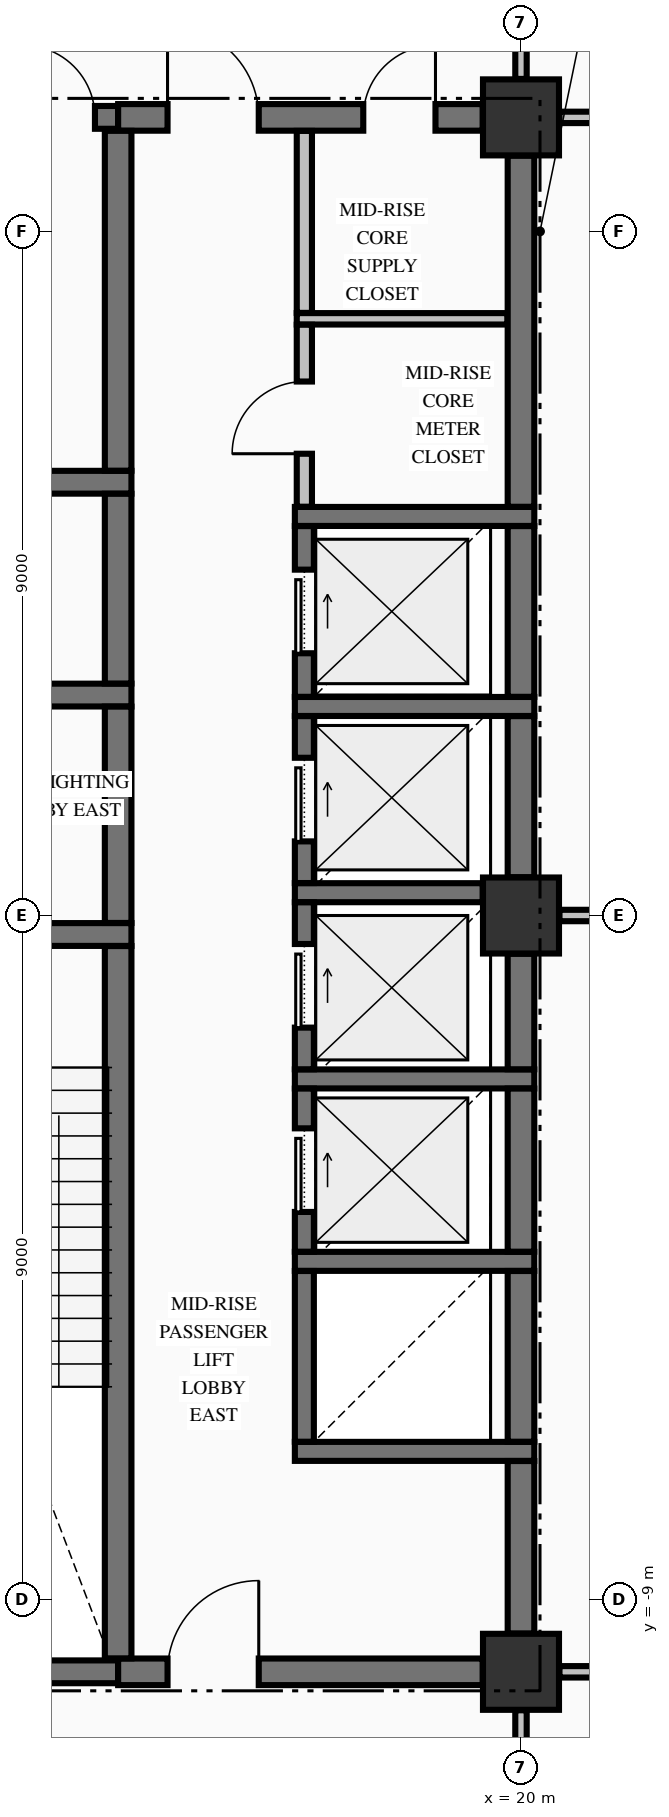
"""IFC4 building model, lengths in metres.
Left out: names, types, materials, properties, quantities, classifications, styles, units other than length and angle.
Written with IfcOpenShell. Run it as: python <this file> out.ifc"""

import sys

from ifc_helpers import new_model, si_unit, direction, frame, frame_2d, origin, origin_2d, place, context, subcontext, project, spatial, rectangle, extrude, element, fill, save


model = new_model("IFC4")
c1 = context("Model", 3, precision=1e-05, world=origin(), true_north=direction((0.0, 1.0)))
c2 = subcontext(c1, "Body", "Model", "MODEL_VIEW")
j1 = project(units=[si_unit("LENGTHUNIT", "METRE"), si_unit("PLANEANGLEUNIT", "RADIAN")], contexts=[c1])
p1 = place(None, origin())
s1 = spatial("IfcSite", under=j1, at=p1, CompositionType="ELEMENT")
p2 = place(p1, origin())
s2 = spatial("IfcBuilding", under=s1, at=p2, CompositionType="ELEMENT")
p3 = place(p2, frame((0.0, 0.0, 116.35)))
s3 = spatial("IfcBuildingStorey", under=s2, at=p3, CompositionType="ELEMENT", Elevation=116.35)
for number, where, z_axis, x_axis in (
    (1, (20.0, -9.95, -0.425), (0.0, 0.0, 1.0), (1.0, 0.0, 0.0)),
    (2, (20.0, 10.5, -0.425), (0.0, 0.0, 1.0), (1.0, 0.0, 0.0)),
    (3, (20.0, 0.0, -0.425), (0.0, 0.0, 1.0), (1.0, 0.0, 0.0)),
):
    element("IfcColumn", number, at=place(p3, frame(where, z_axis=z_axis, x_axis=x_axis)), inside=s3, PredefinedType="COLUMN", context=c2, shape_type="SweptSolid", body=[
        extrude(rectangle(XDim=1.0, YDim=1.0, at=origin_2d()), origin(), (0.0, 0.0, 1.0), 5.0),
    ])
p4 = place(p3, frame((11.504, -9.95, 0.0), z_axis=(0.0, 0.0, 1.0), x_axis=(1.0, 0.0, 0.0)))
e4 = element("IfcWall", 4, at=p4, inside=s3, PredefinedType="SHEAR", context=c2, shape_type="SweptSolid", body=[
    extrude(rectangle(XDim=3.196, YDim=0.3, at=frame_2d((1.598, 0.0))), origin(), (0.0, 0.0, 1.0), 4.575),
])
p5 = place(p3, frame((14.7, -9.95, 0.0), z_axis=(0.0, 0.0, 1.0), x_axis=(1.0, 0.0, 0.0)))
e5 = element("IfcWall", 5, at=p5, inside=s3, PredefinedType="SHEAR", context=c2, shape_type="SweptSolid", body=[
    extrude(rectangle(XDim=4.796, YDim=0.35, at=frame_2d((2.398, 0.0))), origin(), (0.0, 0.0, 1.0), 4.575),
])
p6 = place(p5, frame((0.65, 0.0, 0.0)))
e6 = element("IfcOpeningElement", 6, at=p6, cuts=e5, PredefinedType="OPENING", context=c2, shape_type="SweptSolid", body=[
    extrude(rectangle(XDim=1.2, YDim=2.15, at=frame_2d((0.6, 1.075))), frame((0.0, 0.185, 0.0), z_axis=(0.0, -1.0, 0.0), x_axis=(1.0, 0.0, 0.0)), (0.0, 0.0, 1.0), 0.37),
])
for number, where, z_axis, x_axis in (
    (7, (17.025, -7.05, 0.0), (0.0, 0.0, 1.0), (1.0, 0.0, 0.0)),
    (8, (17.025, -4.55, 0.0), (0.0, 0.0, 1.0), (1.0, 0.0, 0.0)),
    (9, (17.025, -2.15, 0.0), (0.0, 0.0, 1.0), (1.0, 0.0, 0.0)),
):
    element("IfcWall", number, at=place(p3, frame(where, z_axis=z_axis, x_axis=x_axis)), inside=s3, PredefinedType="SOLIDWALL", context=c2, shape_type="SweptSolid", body=[
        extrude(rectangle(XDim=3.15, YDim=0.25, at=frame_2d((1.575, 0.0))), origin(), (0.0, 0.0, 1.0), 4.575),
    ])
p7 = place(p3, frame((11.504, -0.25, 0.0), z_axis=(0.0, 0.0, 1.0), x_axis=(1.0, 0.0, 0.0)))
e10 = element("IfcWall", 10, at=p7, inside=s3, PredefinedType="SHEAR", context=c2, shape_type="SweptSolid", body=[
    extrude(rectangle(XDim=3.371, YDim=0.3, at=frame_2d((1.686, 0.0))), origin(), (0.0, 0.0, 1.0), 4.575),
])
p8 = place(p7, frame((1.096, 0.0, 0.0)))
e11 = element("IfcOpeningElement", 11, at=p8, cuts=e10, PredefinedType="OPENING", context=c2, shape_type="SweptSolid", body=[
    extrude(rectangle(XDim=1.1, YDim=2.15, at=frame_2d((0.55, 1.075))), frame((0.0, 0.16, 0.0), z_axis=(0.0, -1.0, 0.0), x_axis=(1.0, 0.0, 0.0)), (0.0, 0.0, 1.0), 0.32),
])
p9 = place(p3, frame((17.025, 0.3, 0.0), z_axis=(0.0, 0.0, 1.0), x_axis=(1.0, 0.0, 0.0)))
e12 = element("IfcWall", 12, at=p9, inside=s3, PredefinedType="SOLIDWALL", context=c2, shape_type="SweptSolid", body=[
    extrude(rectangle(XDim=2.471, YDim=0.25, at=frame_2d((1.236, 0.0))), origin(), (0.0, 0.0, 1.0), 4.575),
])
p10 = place(p3, frame((17.025, 2.75, 0.0), z_axis=(0.0, 0.0, 1.0), x_axis=(1.0, 0.0, 0.0)))
e13 = element("IfcWall", 13, at=p10, inside=s3, PredefinedType="SOLIDWALL", context=c2, shape_type="SweptSolid", body=[
    extrude(rectangle(XDim=3.15, YDim=0.25, at=frame_2d((1.575, 0.0))), origin(), (0.0, 0.0, 1.0), 4.575),
])
p11 = place(p3, frame((10.85, 2.9, 0.0), z_axis=(0.0, 0.0, 1.0), x_axis=(1.0, 0.0, 0.0)))
e14 = element("IfcWall", 14, at=p11, inside=s3, PredefinedType="SHEAR", context=c2, shape_type="SweptSolid", body=[
    extrude(rectangle(XDim=4.025, YDim=0.3, at=frame_2d((2.012, 0.0))), origin(), (0.0, 0.0, 1.0), 4.575),
])
p12 = place(p11, frame((0.85, 0.0, 0.0)))
e15 = element("IfcOpeningElement", 15, at=p12, cuts=e14, PredefinedType="OPENING", context=c2, shape_type="SweptSolid", body=[
    extrude(rectangle(XDim=1.1, YDim=2.2, at=frame_2d((0.55, 1.1))), frame((0.0, 0.16, 0.0), z_axis=(0.0, -1.0, 0.0), x_axis=(1.0, 0.0, 0.0)), (0.0, 0.0, 1.0), 0.32),
])
p13 = place(p3, frame((17.025, 5.25, 0.0), z_axis=(0.0, 0.0, 1.0), x_axis=(1.0, 0.0, 0.0)))
e16 = element("IfcWall", 16, at=p13, inside=s3, PredefinedType="SOLIDWALL", context=c2, shape_type="SweptSolid", body=[
    extrude(rectangle(XDim=3.15, YDim=0.25, at=frame_2d((1.575, 0.0))), origin(), (0.0, 0.0, 1.0), 4.575),
])
p14 = place(p3, frame((10.85, 5.7, 0.0), z_axis=(0.0, 0.0, 1.0), x_axis=(1.0, 0.0, 0.0)))
e17 = element("IfcWall", 17, at=p14, inside=s3, PredefinedType="SHEAR", context=c2, shape_type="SweptSolid", body=[
    extrude(rectangle(XDim=4.025, YDim=0.3, at=frame_2d((2.012, 0.0))), origin(), (0.0, 0.0, 1.0), 4.575),
])
p15 = place(p3, frame((11.504, 10.5, 0.0), z_axis=(0.0, 0.0, 1.0), x_axis=(1.0, 0.0, 0.0)))
e18 = element("IfcWall", 18, at=p15, inside=s3, PredefinedType="SHEAR", context=c2, shape_type="SweptSolid", body=[
    extrude(rectangle(XDim=3.196, YDim=0.3, at=frame_2d((1.598, 0.0))), origin(), (0.0, 0.0, 1.0), 4.575),
])
p16 = place(p15, frame((1.941, 0.0, 0.0)))
e19 = element("IfcOpeningElement", 19, at=p16, cuts=e18, PredefinedType="OPENING", context=c2, shape_type="SweptSolid", body=[
    extrude(rectangle(XDim=0.95, YDim=2.15, at=frame_2d((0.475, 1.075))), frame((0.0, 0.16, 0.0), z_axis=(0.0, -1.0, 0.0), x_axis=(1.0, 0.0, 0.0)), (0.0, 0.0, 1.0), 0.32),
])
p17 = place(p3, frame((14.7, 10.5, 0.0), z_axis=(0.0, 0.0, 1.0), x_axis=(1.0, 0.0, 0.0)))
e20 = element("IfcWall", 20, at=p17, inside=s3, PredefinedType="SHEAR", context=c2, shape_type="SweptSolid", body=[
    extrude(rectangle(XDim=4.796, YDim=0.35, at=frame_2d((2.398, 0.0))), origin(), (0.0, 0.0, 1.0), 4.575),
])
p18 = place(p17, frame((0.65, 0.0, 0.0)))
e21 = element("IfcOpeningElement", 21, at=p18, cuts=e20, PredefinedType="OPENING", context=c2, shape_type="SweptSolid", body=[
    extrude(rectangle(XDim=1.2, YDim=2.15, at=frame_2d((0.6, 1.075))), frame((0.0, 0.185, 0.0), z_axis=(0.0, -1.0, 0.0), x_axis=(1.0, 0.0, 0.0)), (0.0, 0.0, 1.0), 0.37),
])
p19 = place(p17, frame((3.225, 0.0, 0.0)))
e22 = element("IfcOpeningElement", 22, at=p19, cuts=e20, PredefinedType="OPENING", context=c2, shape_type="SweptSolid", body=[
    extrude(rectangle(XDim=0.95, YDim=2.15, at=frame_2d((0.475, 1.075))), frame((0.0, 0.185, 0.0), z_axis=(0.0, -1.0, 0.0), x_axis=(1.0, 0.0, 0.0)), (0.0, 0.0, 1.0), 0.37),
])
p20 = place(p3, frame((20.506, -9.95, 0.0), z_axis=(0.0, 0.0, 1.0), x_axis=(1.0, 0.0, 0.0)))
e23 = element("IfcWall", 23, at=p20, inside=s3, PredefinedType="PARTITIONING", context=c2, shape_type="SweptSolid", body=[
    extrude(rectangle(XDim=7.329, YDim=0.15, at=frame_2d((3.665, 0.0))), origin(), (0.0, 0.0, 1.0), 4.575),
])
p21 = place(p20, frame((3.019, 0.0, 0.0)))
e24 = element("IfcOpeningElement", 24, at=p21, cuts=e23, PredefinedType="OPENING", context=c2, shape_type="SweptSolid", body=[
    extrude(rectangle(XDim=0.95, YDim=2.02, at=frame_2d((0.475, 1.01))), frame((0.0, 0.085, 0.0), z_axis=(0.0, -1.0, 0.0), x_axis=(1.0, 0.0, 0.0)), (0.0, 0.0, 1.0), 0.17),
])
p22 = place(p3, frame((20.506, 0.0, 0.0), z_axis=(0.0, 0.0, 1.0), x_axis=(1.0, 0.0, 0.0)))
e25 = element("IfcWall", 25, at=p22, inside=s3, PredefinedType="PARTITIONING", context=c2, shape_type="SweptSolid", body=[
    extrude(rectangle(XDim=6.888, YDim=0.15, at=frame_2d((3.444, 0.0))), origin(), (0.0, 0.0, 1.0), 4.03),
])
p23 = place(p3, frame((17.05, 7.85, 0.0), z_axis=(0.0, 0.0, 1.0), x_axis=(1.0, 0.0, 0.0)))
e26 = element("IfcWall", 26, at=p23, inside=s3, PredefinedType="PARTITIONING", context=c2, shape_type="SweptSolid", body=[
    extrude(rectangle(XDim=2.772, YDim=0.15, at=frame_2d((1.386, 0.0))), origin(), (0.0, 0.0, 1.0), 4.575),
])
p24 = place(p3, frame((20.506, 10.5, 0.0), z_axis=(0.0, 0.0, 1.0), x_axis=(1.0, 0.0, 0.0)))
e27 = element("IfcWall", 27, at=p24, inside=s3, PredefinedType="PARTITIONING", context=c2, shape_type="SweptSolid", body=[
    extrude(rectangle(XDim=7.329, YDim=0.15, at=frame_2d((3.665, 0.0))), origin(), (0.0, 0.0, 1.0), 4.575),
])
p25 = place(p24, frame((3.019, 0.0, 0.0)))
e28 = element("IfcOpeningElement", 28, at=p25, cuts=e27, PredefinedType="OPENING", context=c2, shape_type="SweptSolid", body=[
    extrude(rectangle(XDim=0.95, YDim=2.02, at=frame_2d((0.475, 1.01))), frame((0.0, 0.085, 0.0), z_axis=(0.0, -1.0, 0.0), x_axis=(1.0, 0.0, 0.0)), (0.0, 0.0, 1.0), 0.17),
])
p26 = place(p3, frame((14.7, -9.773, 0.0), z_axis=(0.0, 0.0, 1.0), x_axis=(0.0, 1.0, 0.0)))
e29 = element("IfcWall", 29, at=p26, inside=s3, PredefinedType="SHEAR", context=c2, shape_type="SweptSolid", body=[
    extrude(rectangle(XDim=9.371, YDim=0.35, at=frame_2d((4.686, 0.0))), origin(), (0.0, 0.0, 1.0), 4.575),
])
p27 = place(p3, frame((14.7, -0.098, 0.0), z_axis=(0.0, 0.0, 1.0), x_axis=(0.0, 1.0, 0.0)))
e30 = element("IfcWall", 30, at=p27, inside=s3, PredefinedType="SHEAR", context=c2, shape_type="SweptSolid", body=[
    extrude(rectangle(XDim=2.846, YDim=0.35, at=frame_2d((1.423, 0.0))), origin(), (0.0, 0.0, 1.0), 4.575),
])
p28 = place(p3, frame((14.7, 3.052, 0.0), z_axis=(0.0, 0.0, 1.0), x_axis=(0.0, 1.0, 0.0)))
e31 = element("IfcWall", 31, at=p28, inside=s3, PredefinedType="SHEAR", context=c2, shape_type="SweptSolid", body=[
    extrude(rectangle(XDim=2.496, YDim=0.35, at=frame_2d((1.248, 0.0))), origin(), (0.0, 0.0, 1.0), 4.575),
])
p29 = place(p3, frame((14.7, 5.852, 0.0), z_axis=(0.0, 0.0, 1.0), x_axis=(0.0, 1.0, 0.0)))
e32 = element("IfcWall", 32, at=p29, inside=s3, PredefinedType="SHEAR", context=c2, shape_type="SweptSolid", body=[
    extrude(rectangle(XDim=4.471, YDim=0.35, at=frame_2d((2.235, 0.0))), origin(), (0.0, 0.0, 1.0), 4.575),
])
p30 = place(p3, frame((17.15, -6.923, 0.0), z_axis=(0.0, 0.0, 1.0), x_axis=(0.0, 1.0, 0.0)))
e33 = element("IfcWall", 33, at=p30, inside=s3, PredefinedType="SOLIDWALL", context=c2, shape_type="SweptSolid", body=[
    extrude(rectangle(XDim=2.246, YDim=0.25, at=frame_2d((1.123, 0.0))), origin(), (0.0, 0.0, 1.0), 4.575),
])
p31 = place(p3, frame((17.15, -4.423, 0.0), z_axis=(0.0, 0.0, 1.0), x_axis=(0.0, 1.0, 0.0)))
e34 = element("IfcWall", 34, at=p31, inside=s3, PredefinedType="SOLIDWALL", context=c2, shape_type="SweptSolid", body=[
    extrude(rectangle(XDim=2.146, YDim=0.25, at=frame_2d((1.073, 0.0))), origin(), (0.0, 0.0, 1.0), 4.575),
])
p32 = place(p31, frame((0.523, 0.0, 0.0)))
e35 = element("IfcOpeningElement", 35, at=p32, cuts=e34, PredefinedType="OPENING", context=c2, shape_type="SweptSolid", body=[
    extrude(rectangle(XDim=1.1, YDim=2.2, at=frame_2d((0.55, 1.1))), frame((0.0, 0.135, 0.0), z_axis=(0.0, -1.0, 0.0), x_axis=(1.0, 0.0, 0.0)), (0.0, 0.0, 1.0), 0.27),
])
p33 = place(p3, frame((17.15, -2.023, 0.0), z_axis=(0.0, 0.0, 1.0), x_axis=(0.0, 1.0, 0.0)))
e36 = element("IfcWall", 36, at=p33, inside=s3, PredefinedType="SOLIDWALL", context=c2, shape_type="SweptSolid", body=[
    extrude(rectangle(XDim=2.196, YDim=0.25, at=frame_2d((1.098, 0.0))), origin(), (0.0, 0.0, 1.0), 4.575),
])
p34 = place(p33, frame((0.548, 0.0, 0.0)))
e37 = element("IfcOpeningElement", 37, at=p34, cuts=e36, PredefinedType="OPENING", context=c2, shape_type="SweptSolid", body=[
    extrude(rectangle(XDim=1.1, YDim=2.2, at=frame_2d((0.55, 1.1))), frame((0.0, 0.135, 0.0), z_axis=(0.0, -1.0, 0.0), x_axis=(1.0, 0.0, 0.0)), (0.0, 0.0, 1.0), 0.27),
])
p35 = place(p3, frame((17.15, 0.427, 0.0), z_axis=(0.0, 0.0, 1.0), x_axis=(0.0, 1.0, 0.0)))
e38 = element("IfcWall", 38, at=p35, inside=s3, PredefinedType="SOLIDWALL", context=c2, shape_type="SweptSolid", body=[
    extrude(rectangle(XDim=2.196, YDim=0.25, at=frame_2d((1.098, 0.0))), origin(), (0.0, 0.0, 1.0), 4.575),
])
p36 = place(p35, frame((0.548, 0.0, 0.0)))
e39 = element("IfcOpeningElement", 39, at=p36, cuts=e38, PredefinedType="OPENING", context=c2, shape_type="SweptSolid", body=[
    extrude(rectangle(XDim=1.1, YDim=2.2, at=frame_2d((0.55, 1.1))), frame((0.0, 0.135, 0.0), z_axis=(0.0, -1.0, 0.0), x_axis=(1.0, 0.0, 0.0)), (0.0, 0.0, 1.0), 0.27),
])
p37 = place(p3, frame((17.15, 2.877, 0.0), z_axis=(0.0, 0.0, 1.0), x_axis=(0.0, 1.0, 0.0)))
e40 = element("IfcWall", 40, at=p37, inside=s3, PredefinedType="SOLIDWALL", context=c2, shape_type="SweptSolid", body=[
    extrude(rectangle(XDim=2.246, YDim=0.25, at=frame_2d((1.123, 0.0))), origin(), (0.0, 0.0, 1.0), 4.575),
])
p38 = place(p37, frame((0.573, 0.0, 0.0)))
e41 = element("IfcOpeningElement", 41, at=p38, cuts=e40, PredefinedType="OPENING", context=c2, shape_type="SweptSolid", body=[
    extrude(rectangle(XDim=1.1, YDim=2.2, at=frame_2d((0.55, 1.1))), frame((0.0, 0.135, 0.0), z_axis=(0.0, -1.0, 0.0), x_axis=(1.0, 0.0, 0.0)), (0.0, 0.0, 1.0), 0.27),
])
p39 = place(p3, frame((20.0, -9.446, 0.0), z_axis=(0.0, 0.0, 1.0), x_axis=(0.0, 1.0, 0.0)))
e42 = element("IfcWall", 42, at=p39, inside=s3, PredefinedType="SHEAR", context=c2, shape_type="SweptSolid", body=[
    extrude(rectangle(XDim=2.269, YDim=0.35, at=frame_2d((1.135, 0.0))), origin(), (0.0, 0.0, 1.0), 4.575),
])
p40 = place(p3, frame((20.0, -6.923, 0.0), z_axis=(0.0, 0.0, 1.0), x_axis=(0.0, 1.0, 0.0)))
e43 = element("IfcWall", 43, at=p40, inside=s3, PredefinedType="SHEAR", context=c2, shape_type="SweptSolid", body=[
    extrude(rectangle(XDim=2.246, YDim=0.35, at=frame_2d((1.123, 0.0))), origin(), (0.0, 0.0, 1.0), 4.575),
])
p41 = place(p3, frame((20.0, -4.423, 0.0), z_axis=(0.0, 0.0, 1.0), x_axis=(0.0, 1.0, 0.0)))
e44 = element("IfcWall", 44, at=p41, inside=s3, PredefinedType="SHEAR", context=c2, shape_type="SweptSolid", body=[
    extrude(rectangle(XDim=2.146, YDim=0.35, at=frame_2d((1.073, 0.0))), origin(), (0.0, 0.0, 1.0), 4.575),
])
p42 = place(p3, frame((20.0, -2.023, 0.0), z_axis=(0.0, 0.0, 1.0), x_axis=(0.0, 1.0, 0.0)))
e45 = element("IfcWall", 45, at=p42, inside=s3, PredefinedType="SHEAR", context=c2, shape_type="SweptSolid", body=[
    extrude(rectangle(XDim=1.519, YDim=0.35, at=frame_2d((0.76, 0.0))), origin(), (0.0, 0.0, 1.0), 4.575),
])
p43 = place(p3, frame((20.0, 0.504, 0.0), z_axis=(0.0, 0.0, 1.0), x_axis=(0.0, 1.0, 0.0)))
e46 = element("IfcWall", 46, at=p43, inside=s3, PredefinedType="SHEAR", context=c2, shape_type="SweptSolid", body=[
    extrude(rectangle(XDim=2.119, YDim=0.35, at=frame_2d((1.06, 0.0))), origin(), (0.0, 0.0, 1.0), 4.575),
])
p44 = place(p3, frame((20.0, 2.877, 0.0), z_axis=(0.0, 0.0, 1.0), x_axis=(0.0, 1.0, 0.0)))
e47 = element("IfcWall", 47, at=p44, inside=s3, PredefinedType="SHEAR", context=c2, shape_type="SweptSolid", body=[
    extrude(rectangle(XDim=2.246, YDim=0.35, at=frame_2d((1.123, 0.0))), origin(), (0.0, 0.0, 1.0), 4.575),
])
p45 = place(p3, frame((20.0, 5.377, 0.0), z_axis=(0.0, 0.0, 1.0), x_axis=(0.0, 1.0, 0.0)))
e48 = element("IfcWall", 48, at=p45, inside=s3, PredefinedType="SHEAR", context=c2, shape_type="SweptSolid", body=[
    extrude(rectangle(XDim=4.619, YDim=0.35, at=frame_2d((2.31, 0.0))), origin(), (0.0, 0.0, 1.0), 4.575),
])
p46 = place(p3, frame((17.15, 5.378, 0.0), z_axis=(0.0, 0.0, 1.0), x_axis=(0.0, 1.0, 0.0)))
e49 = element("IfcWall", 49, at=p46, inside=s3, PredefinedType="PARTITIONING", context=c2, shape_type="SweptSolid", body=[
    extrude(rectangle(XDim=2.394, YDim=0.2, at=frame_2d((1.197, 0.0))), origin(), (0.0, 0.0, 1.0), 4.575),
])
p47 = place(p46, frame((0.697, 0.0, 0.0)))
e50 = element("IfcOpeningElement", 50, at=p47, cuts=e49, PredefinedType="OPENING", context=c2, shape_type="SweptSolid", body=[
    extrude(rectangle(XDim=0.95, YDim=2.15, at=frame_2d((0.475, 1.075))), frame((0.0, 0.11, 0.0), z_axis=(0.0, -1.0, 0.0), x_axis=(1.0, 0.0, 0.0)), (0.0, 0.0, 1.0), 0.22),
])
p48 = place(p3, frame((17.15, 7.928, 0.0), z_axis=(0.0, 0.0, 1.0), x_axis=(0.0, 1.0, 0.0)))
e51 = element("IfcWall", 51, at=p48, inside=s3, PredefinedType="PARTITIONING", context=c2, shape_type="SweptSolid", body=[
    extrude(rectangle(XDim=2.394, YDim=0.2, at=frame_2d((1.197, 0.0))), origin(), (0.0, 0.0, 1.0), 4.575),
])
p49 = place(p3, frame((20.0, -12.722, 0.0), z_axis=(0.0, 0.0, 1.0), x_axis=(0.0, 1.0, 0.0)))
e52 = element("IfcWall", 52, at=p49, inside=s3, PredefinedType="PARTITIONING", context=c2, shape_type="SweptSolid", body=[
    extrude(rectangle(XDim=2.266, YDim=0.15, at=frame_2d((1.133, 0.0))), origin(), (0.0, 0.0, 1.0), 4.03),
])
p50 = place(p49, frame((0.867, 0.0, 0.0)))
e53 = element("IfcOpeningElement", 53, at=p50, cuts=e52, PredefinedType="OPENING", context=c2, shape_type="SweptSolid", body=[
    extrude(rectangle(XDim=0.95, YDim=2.02, at=frame_2d((0.475, 1.01))), frame((0.0, 0.085, 0.0), z_axis=(0.0, -1.0, 0.0), x_axis=(1.0, 0.0, 0.0)), (0.0, 0.0, 1.0), 0.17),
])
p51 = place(p3, frame((20.0, 11.006, 0.0), z_axis=(0.0, 0.0, 1.0), x_axis=(0.0, 1.0, 0.0)))
e54 = element("IfcWall", 54, at=p51, inside=s3, PredefinedType="PARTITIONING", context=c2, shape_type="SweptSolid", body=[
    extrude(rectangle(XDim=2.266, YDim=0.15, at=frame_2d((1.133, 0.0))), origin(), (0.0, 0.0, 1.0), 4.03),
])
p52 = place(p51, frame((0.449, 0.0, 0.0)))
e55 = element("IfcOpeningElement", 55, at=p52, cuts=e54, PredefinedType="OPENING", context=c2, shape_type="SweptSolid", body=[
    extrude(rectangle(XDim=0.95, YDim=2.02, at=frame_2d((0.475, 1.01))), frame((0.0, 0.085, 0.0), z_axis=(0.0, -1.0, 0.0), x_axis=(1.0, 0.0, 0.0)), (0.0, 0.0, 1.0), 0.17),
])
p53 = place(p16, origin())
e56 = element("IfcDoor", 56, at=p53, inside=s3, OperationType="SINGLE_SWING_LEFT", PredefinedType="DOOR", context=c2, shape_type="SweptSolid", body=[
    extrude(rectangle(XDim=0.95, YDim=2.15, at=frame_2d((0.475, 1.075))), frame((0.0, 0.025, 0.0), z_axis=(0.0, -1.0, 0.0), x_axis=(1.0, 0.0, 0.0)), (0.0, 0.0, 1.0), 0.05),
])
fill(e19, e56)
p54 = place(p32, origin())
e57 = element("IfcDoor", 57, at=p54, inside=s3, OperationType="SLIDING_TO_RIGHT", PredefinedType="DOOR", context=c2, shape_type="SweptSolid", body=[
    extrude(rectangle(XDim=1.1, YDim=2.2, at=frame_2d((0.55, 1.1))), frame((0.0, 0.025, 0.0), z_axis=(0.0, -1.0, 0.0), x_axis=(1.0, 0.0, 0.0)), (0.0, 0.0, 1.0), 0.05),
])
fill(e35, e57)
p55 = place(p34, origin())
e58 = element("IfcDoor", 58, at=p55, inside=s3, OperationType="SLIDING_TO_RIGHT", PredefinedType="DOOR", context=c2, shape_type="SweptSolid", body=[
    extrude(rectangle(XDim=1.1, YDim=2.2, at=frame_2d((0.55, 1.1))), frame((0.0, 0.025, 0.0), z_axis=(0.0, -1.0, 0.0), x_axis=(1.0, 0.0, 0.0)), (0.0, 0.0, 1.0), 0.05),
])
fill(e37, e58)
p56 = place(p36, origin())
e59 = element("IfcDoor", 59, at=p56, inside=s3, OperationType="SLIDING_TO_RIGHT", PredefinedType="DOOR", context=c2, shape_type="SweptSolid", body=[
    extrude(rectangle(XDim=1.1, YDim=2.2, at=frame_2d((0.55, 1.1))), frame((0.0, 0.025, 0.0), z_axis=(0.0, -1.0, 0.0), x_axis=(1.0, 0.0, 0.0)), (0.0, 0.0, 1.0), 0.05),
])
fill(e39, e59)
p57 = place(p38, origin())
e60 = element("IfcDoor", 60, at=p57, inside=s3, OperationType="SLIDING_TO_RIGHT", PredefinedType="DOOR", context=c2, shape_type="SweptSolid", body=[
    extrude(rectangle(XDim=1.1, YDim=2.2, at=frame_2d((0.55, 1.1))), frame((0.0, 0.025, 0.0), z_axis=(0.0, -1.0, 0.0), x_axis=(1.0, 0.0, 0.0)), (0.0, 0.0, 1.0), 0.05),
])
fill(e41, e60)
p58 = place(p6, origin())
e61 = element("IfcDoor", 61, at=p58, inside=s3, OperationType="SINGLE_SWING_RIGHT", PredefinedType="DOOR", context=c2, shape_type="SweptSolid", body=[
    extrude(rectangle(XDim=1.2, YDim=2.15, at=frame_2d((0.6, 1.075))), frame((0.0, 0.025, 0.0), z_axis=(0.0, -1.0, 0.0), x_axis=(1.0, 0.0, 0.0)), (0.0, 0.0, 1.0), 0.05),
])
fill(e6, e61)
p59 = place(p18, origin())
e62 = element("IfcDoor", 62, at=p59, inside=s3, OperationType="SINGLE_SWING_LEFT", PredefinedType="DOOR", context=c2, shape_type="SweptSolid", body=[
    extrude(rectangle(XDim=1.2, YDim=2.15, at=frame_2d((0.6, 1.075))), frame((0.0, 0.025, 0.0), z_axis=(0.0, -1.0, 0.0), x_axis=(1.0, 0.0, 0.0)), (0.0, 0.0, 1.0), 0.05),
])
fill(e21, e62)
p60 = place(p19, origin())
e63 = element("IfcDoor", 63, at=p60, inside=s3, OperationType="SINGLE_SWING_RIGHT", PredefinedType="DOOR", context=c2, shape_type="SweptSolid", body=[
    extrude(rectangle(XDim=0.95, YDim=2.15, at=frame_2d((0.475, 1.075))), frame((0.0, 0.025, 0.0), z_axis=(0.0, -1.0, 0.0), x_axis=(1.0, 0.0, 0.0)), (0.0, 0.0, 1.0), 0.05),
])
fill(e22, e63)
p61 = place(p47, origin())
e64 = element("IfcDoor", 64, at=p61, inside=s3, OperationType="SINGLE_SWING_LEFT", PredefinedType="DOOR", context=c2, shape_type="SweptSolid", body=[
    extrude(rectangle(XDim=0.95, YDim=2.15, at=frame_2d((0.475, 1.075))), frame((0.0, 0.025, 0.0), z_axis=(0.0, -1.0, 0.0), x_axis=(1.0, 0.0, 0.0)), (0.0, 0.0, 1.0), 0.05),
])
fill(e50, e64)
save(model, sys.argv[1])
